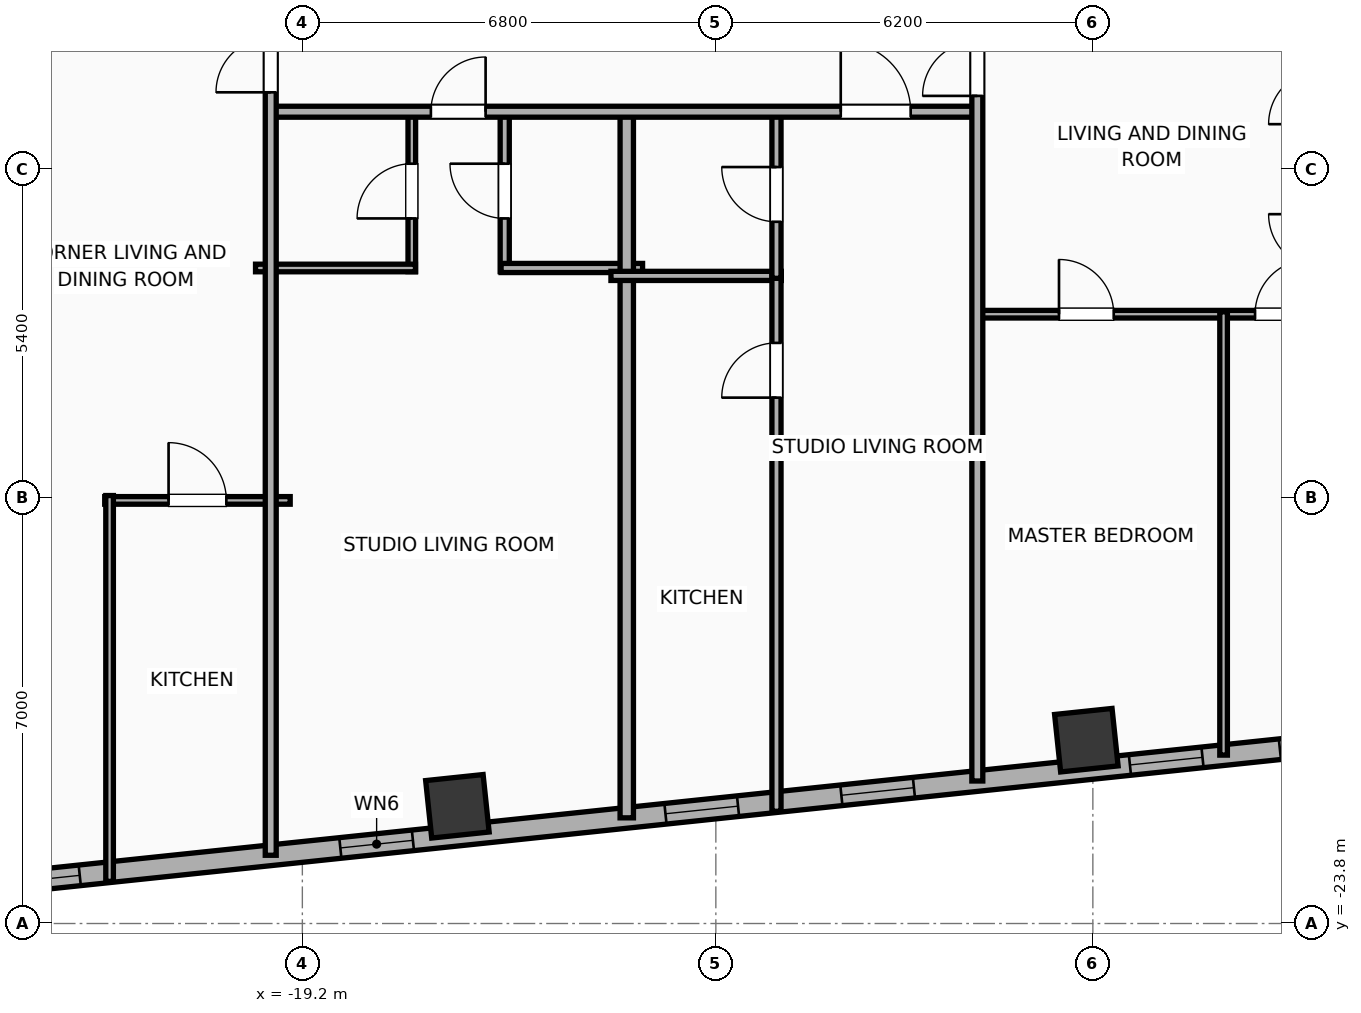
"""IFC4 building model, lengths in metres.
Left out: names, types, materials, properties, quantities, classifications, styles, units other than length and angle.
Written with IfcOpenShell. Run it as: python <this file> out.ifc"""

import sys

from ifc_helpers import new_model, si_unit, direction, frame, frame_2d, origin, origin_2d, place, context, subcontext, project, spatial, rectangle, hollow_rectangle, extrude, element, fill, save


model = new_model("IFC4")
c1 = context("Model", 3, precision=1e-05, world=origin(), true_north=direction((0.0, 1.0)))
c2 = subcontext(c1, "Body", "Model", "MODEL_VIEW")
j1 = project(units=[si_unit("LENGTHUNIT", "METRE"), si_unit("PLANEANGLEUNIT", "RADIAN")], contexts=[c1])
p1 = place(None, origin())
s1 = spatial("IfcSite", under=j1, at=p1, CompositionType="ELEMENT")
p2 = place(p1, origin())
s2 = spatial("IfcBuilding", under=s1, at=p2, CompositionType="ELEMENT")
p3 = place(p2, frame((0.0, 0.0, 156.0)))
s3 = spatial("IfcBuildingStorey", under=s2, at=p3, CompositionType="ELEMENT", Elevation=156.0)
for number, where, z_axis, x_axis in (
    (1, (-16.65, -21.873, 0.0), (0.0, 0.0, 1.0), (0.995, 0.105, 0.0)),
    (2, (-6.307, -20.785, 0.0), (0.0, 0.0, 1.0), (0.995, 0.105, 0.0)),
):
    element("IfcColumn", number, at=place(p3, frame(where, z_axis=z_axis, x_axis=x_axis)), inside=s3, PredefinedType="COLUMN", context=c2, shape_type="SweptSolid", body=[
        extrude(hollow_rectangle(XDim=0.95, YDim=0.95, WallThickness=0.032, at=origin_2d()), origin(), (0.0, 0.0, 1.0), 3.9),
    ])
p4 = place(p3, frame((24.756, -18.003, 0.0), z_axis=(0.0, 0.0, 1.0), x_axis=(-0.99452160744, -0.104531202687, 0.0)))
e3 = element("IfcWall", 3, at=p4, inside=s3, PredefinedType="ELEMENTEDWALL", context=c2, shape_type="SweptSolid", body=[
    extrude(rectangle(XDim=51.967, YDim=0.34, at=frame_2d((25.983, 0.0))), origin(), (0.0, 0.0, 1.0), 3.65),
])
p5 = place(p4, frame((25.633, 0.0, 0.75)))
e4 = element("IfcOpeningElement", 4, at=p5, cuts=e3, PredefinedType="OPENING", context=c2, shape_type="SweptSolid", body=[
    extrude(rectangle(XDim=2.4, YDim=2.1, at=frame_2d((1.2, 1.05))), frame((0.0, 0.18, 0.0), z_axis=(0.0, -1.0, 0.0), x_axis=(1.0, 0.0, 0.0)), (0.0, 0.0, 1.0), 0.36),
])
p6 = place(p4, frame((42.369, 0.0, 0.75)))
e5 = element("IfcOpeningElement", 5, at=p6, cuts=e3, PredefinedType="OPENING", context=c2, shape_type="SweptSolid", body=[
    extrude(rectangle(XDim=1.2, YDim=2.05, at=frame_2d((0.6, 1.025))), frame((0.0, 0.18, 0.0), z_axis=(0.0, -1.0, 0.0), x_axis=(1.0, 0.0, 0.0)), (0.0, 0.0, 1.0), 0.36),
])
p7 = place(p4, frame((34.085, 0.0, 0.75)))
e6 = element("IfcOpeningElement", 6, at=p7, cuts=e3, PredefinedType="OPENING", context=c2, shape_type="SweptSolid", body=[
    extrude(rectangle(XDim=1.2, YDim=2.05, at=frame_2d((0.6, 1.025))), frame((0.0, 0.18, 0.0), z_axis=(0.0, -1.0, 0.0), x_axis=(1.0, 0.0, 0.0)), (0.0, 0.0, 1.0), 0.36),
])
p8 = place(p4, frame((36.993, 0.0, 0.75)))
e7 = element("IfcOpeningElement", 7, at=p8, cuts=e3, PredefinedType="OPENING", context=c2, shape_type="SweptSolid", body=[
    extrude(rectangle(XDim=1.2, YDim=2.05, at=frame_2d((0.6, 1.025))), frame((0.0, 0.18, 0.0), z_axis=(0.0, -1.0, 0.0), x_axis=(1.0, 0.0, 0.0)), (0.0, 0.0, 1.0), 0.36),
])
p9 = place(p4, frame((14.397, 0.0, 0.75)))
e8 = element("IfcOpeningElement", 8, at=p9, cuts=e3, PredefinedType="OPENING", context=c2, shape_type="SweptSolid", body=[
    extrude(rectangle(XDim=1.2, YDim=2.05, at=frame_2d((0.6, 1.025))), frame((0.0, 0.18, 0.0), z_axis=(0.0, -1.0, 0.0), x_axis=(1.0, 0.0, 0.0)), (0.0, 0.0, 1.0), 0.36),
])
p10 = place(p4, frame((11.489, 0.0, 0.75)))
e9 = element("IfcOpeningElement", 9, at=p10, cuts=e3, PredefinedType="OPENING", context=c2, shape_type="SweptSolid", body=[
    extrude(rectangle(XDim=1.2, YDim=2.05, at=frame_2d((0.6, 1.025))), frame((0.0, 0.18, 0.0), z_axis=(0.0, -1.0, 0.0), x_axis=(1.0, 0.0, 0.0)), (0.0, 0.0, 1.0), 0.36),
])
p11 = place(p4, frame((8.521, 0.0, 0.75)))
e10 = element("IfcOpeningElement", 10, at=p11, cuts=e3, PredefinedType="OPENING", context=c2, shape_type="SweptSolid", body=[
    extrude(rectangle(XDim=1.2, YDim=2.05, at=frame_2d((0.6, 1.025))), frame((0.0, 0.18, 0.0), z_axis=(0.0, -1.0, 0.0), x_axis=(1.0, 0.0, 0.0)), (0.0, 0.0, 1.0), 0.36),
])
p12 = place(p4, frame((5.582, 0.0, 0.75)))
e11 = element("IfcOpeningElement", 11, at=p12, cuts=e3, PredefinedType="OPENING", context=c2, shape_type="SweptSolid", body=[
    extrude(rectangle(XDim=1.2, YDim=2.05, at=frame_2d((0.6, 1.025))), frame((0.0, 0.18, 0.0), z_axis=(0.0, -1.0, 0.0), x_axis=(1.0, 0.0, 0.0)), (0.0, 0.0, 1.0), 0.36),
])
p13 = place(p4, frame((29.313, 0.0, 0.75)))
e12 = element("IfcOpeningElement", 12, at=p13, cuts=e3, PredefinedType="OPENING", context=c2, shape_type="SweptSolid", body=[
    extrude(rectangle(XDim=1.2, YDim=2.05, at=frame_2d((0.6, 1.025))), frame((0.0, 0.18, 0.0), z_axis=(0.0, -1.0, 0.0), x_axis=(1.0, 0.0, 0.0)), (0.0, 0.0, 1.0), 0.36),
])
p14 = place(p4, frame((22.248, 0.0, 0.75)))
e13 = element("IfcOpeningElement", 13, at=p14, cuts=e3, PredefinedType="OPENING", context=c2, shape_type="SweptSolid", body=[
    extrude(rectangle(XDim=1.2, YDim=2.05, at=frame_2d((0.6, 1.025))), frame((0.0, 0.18, 0.0), z_axis=(0.0, -1.0, 0.0), x_axis=(1.0, 0.0, 0.0)), (0.0, 0.0, 1.0), 0.36),
])
p15 = place(p4, frame((18.186, 0.0, 0.75)))
e14 = element("IfcOpeningElement", 14, at=p15, cuts=e3, PredefinedType="OPENING", context=c2, shape_type="SweptSolid", body=[
    extrude(rectangle(XDim=1.2, YDim=2.05, at=frame_2d((0.6, 1.025))), frame((0.0, 0.18, 0.0), z_axis=(0.0, -1.0, 0.0), x_axis=(1.0, 0.0, 0.0)), (0.0, 0.0, 1.0), 0.36),
])
p16 = place(p4, frame((47.879, 0.0, 0.75)))
e15 = element("IfcOpeningElement", 15, at=p16, cuts=e3, PredefinedType="OPENING", context=c2, shape_type="SweptSolid", body=[
    extrude(rectangle(XDim=1.2, YDim=2.05, at=frame_2d((0.6, 1.025))), frame((0.0, 0.18, 0.0), z_axis=(0.0, -1.0, 0.0), x_axis=(1.0, 0.0, 0.0)), (0.0, 0.0, 1.0), 0.36),
])
p17 = place(p4, frame((49.844, 0.0, 0.75)))
e16 = element("IfcOpeningElement", 16, at=p17, cuts=e3, PredefinedType="OPENING", context=c2, shape_type="SweptSolid", body=[
    extrude(rectangle(XDim=1.2, YDim=2.05, at=frame_2d((0.6, 1.025))), frame((0.0, 0.18, 0.0), z_axis=(0.0, -1.0, 0.0), x_axis=(1.0, 0.0, 0.0)), (0.0, 0.0, 1.0), 0.36),
])
p18 = place(p3, frame((-17.4, -13.08, 0.0), z_axis=(0.0, 0.0, 1.0), x_axis=(0.0, 1.0, 0.0)))
e17 = element("IfcWall", 17, at=p18, inside=s3, PredefinedType="PARTITIONING", context=c2, shape_type="SweptSolid", body=[
    extrude(rectangle(XDim=2.65, YDim=0.125, at=frame_2d((1.325, 0.0))), origin(), (0.0, 0.0, 1.0), 3.65),
])
p19 = place(p18, frame((0.875, 0.0, 0.0)))
e18 = element("IfcOpeningElement", 18, at=p19, cuts=e17, PredefinedType="OPENING", context=c2, shape_type="SweptSolid", body=[
    extrude(rectangle(XDim=0.9, YDim=2.05, at=frame_2d((0.45, 1.025))), frame((0.0, 0.073, 0.0), z_axis=(0.0, -1.0, 0.0), x_axis=(1.0, 0.0, 0.0)), (0.0, 0.0, 1.0), 0.145),
])
p20 = place(p3, frame((-15.872, -13.08, 0.0), z_axis=(0.0, 0.0, 1.0), x_axis=(0.0, 1.0, 0.0)))
e19 = element("IfcWall", 19, at=p20, inside=s3, PredefinedType="PLUMBINGWALL", context=c2, shape_type="SweptSolid", body=[
    extrude(rectangle(XDim=2.65, YDim=0.15, at=frame_2d((1.325, 0.0))), origin(), (0.0, 0.0, 1.0), 3.04),
])
p21 = place(p20, frame((0.875, 0.0, 0.0)))
e20 = element("IfcOpeningElement", 20, at=p21, cuts=e19, PredefinedType="OPENING", context=c2, shape_type="SweptSolid", body=[
    extrude(rectangle(XDim=0.9, YDim=2.05, at=frame_2d((0.45, 1.025))), frame((0.0, 0.085, 0.0), z_axis=(0.0, -1.0, 0.0), x_axis=(1.0, 0.0, 0.0)), (0.0, 0.0, 1.0), 0.17),
])
p22 = place(p3, frame((-19.97, -13.02, 0.0), z_axis=(0.0, 0.0, 1.0), x_axis=(1.0, 0.0, 0.0)))
e21 = element("IfcWall", 21, at=p22, inside=s3, PredefinedType="PARTITIONING", context=c2, shape_type="SweptSolid", body=[
    extrude(rectangle(XDim=2.63, YDim=0.125, at=frame_2d((1.315, 0.0))), origin(), (0.0, 0.0, 1.0), 3.65),
])
p23 = place(p3, frame((-15.932, -13.02, 0.0), z_axis=(0.0, 0.0, 1.0), x_axis=(1.0, 0.0, 0.0)))
e22 = element("IfcWall", 22, at=p23, inside=s3, PredefinedType="PLUMBINGWALL", context=c2, shape_type="SweptSolid", body=[
    extrude(rectangle(XDim=2.327, YDim=0.15, at=frame_2d((1.164, 0.0))), origin(), (0.0, 0.0, 1.0), 3.65),
])
p24 = place(p3, frame((-13.865, -22.062, 0.0), z_axis=(0.0, 0.0, 1.0), x_axis=(0.0, 1.0, 0.0)))
e23 = element("IfcWall", 23, at=p24, inside=s3, PredefinedType="PARTITIONING", context=c2, shape_type="SweptSolid", body=[
    extrude(rectangle(XDim=11.692, YDim=0.22, at=frame_2d((5.846, 0.0))), origin(), (0.0, 0.0, 1.0), 3.65),
])
p25 = place(p3, frame((-14.125, -13.15, 0.0), z_axis=(0.0, 0.0, 1.0), x_axis=(1.0, 0.0, 0.0)))
e24 = element("IfcWall", 24, at=p25, inside=s3, PredefinedType="PLUMBINGWALL", context=c2, shape_type="SweptSolid", body=[
    extrude(rectangle(XDim=2.802, YDim=0.15, at=frame_2d((1.401, 0.0))), origin(), (0.0, 0.0, 1.0), 3.65),
])
p26 = place(p3, frame((-11.403, -21.954, 0.0), z_axis=(0.0, 0.0, 1.0), x_axis=(0.0, 1.0, 0.0)))
e25 = element("IfcWall", 25, at=p26, inside=s3, PredefinedType="PLUMBINGWALL", context=c2, shape_type="SweptSolid", body=[
    extrude(rectangle(XDim=8.844, YDim=0.15, at=frame_2d((4.422, 0.0))), origin(), (0.0, 0.0, 1.0), 3.65),
])
p27 = place(p26, frame((6.802, 0.0, 0.0)))
e26 = element("IfcOpeningElement", 26, at=p27, cuts=e25, PredefinedType="OPENING", context=c2, shape_type="SweptSolid", body=[
    extrude(rectangle(XDim=0.9, YDim=2.05, at=frame_2d((0.45, 1.025))), frame((0.0, 0.085, 0.0), z_axis=(0.0, -1.0, 0.0), x_axis=(1.0, 0.0, 0.0)), (0.0, 0.0, 1.0), 0.17),
])
p28 = place(p3, frame((-11.403, -13.19, 0.0), z_axis=(0.0, 0.0, 1.0), x_axis=(0.0, 1.0, 0.0)))
e27 = element("IfcWall", 27, at=p28, inside=s3, PredefinedType="PLUMBINGWALL", context=c2, shape_type="SweptSolid", body=[
    extrude(rectangle(XDim=2.76, YDim=0.15, at=frame_2d((1.38, 0.0))), origin(), (0.0, 0.0, 1.0), 3.65),
])
p29 = place(p28, frame((0.93, 0.0, 0.0)))
e28 = element("IfcOpeningElement", 28, at=p29, cuts=e27, PredefinedType="OPENING", context=c2, shape_type="SweptSolid", body=[
    extrude(rectangle(XDim=0.9, YDim=2.05, at=frame_2d((0.45, 1.025))), frame((0.0, 0.085, 0.0), z_axis=(0.0, -1.0, 0.0), x_axis=(1.0, 0.0, 0.0)), (0.0, 0.0, 1.0), 0.17),
])
p30 = place(p3, frame((-19.75, -10.45, 0.0), z_axis=(0.0, 0.0, 1.0), x_axis=(1.0, 0.0, 0.0)))
e29 = element("IfcWall", 29, at=p30, inside=s3, PredefinedType="PARTITIONING", context=c2, shape_type="SweptSolid", body=[
    extrude(rectangle(XDim=11.67, YDim=0.18, at=frame_2d((5.835, 0.0))), origin(), (0.0, 0.0, 1.0), 3.65),
])
p31 = place(p30, frame((2.664, 0.0, 0.0)))
e30 = element("IfcOpeningElement", 30, at=p31, cuts=e29, PredefinedType="OPENING", context=c2, shape_type="SweptSolid", body=[
    extrude(rectangle(XDim=0.9, YDim=2.05, at=frame_2d((0.45, 1.025))), frame((0.0, 0.1, 0.0), z_axis=(0.0, -1.0, 0.0), x_axis=(1.0, 0.0, 0.0)), (0.0, 0.0, 1.0), 0.2),
])
p32 = place(p30, frame((9.404, 0.0, 0.0)))
e31 = element("IfcOpeningElement", 31, at=p32, cuts=e29, PredefinedType="OPENING", context=c2, shape_type="SweptSolid", body=[
    extrude(rectangle(XDim=1.15, YDim=2.05, at=frame_2d((0.575, 1.025))), frame((0.0, 0.1, 0.0), z_axis=(0.0, -1.0, 0.0), x_axis=(1.0, 0.0, 0.0)), (0.0, 0.0, 1.0), 0.2),
])
p33 = place(p3, frame((-8.08, -13.78, 0.0), z_axis=(0.0, 0.0, 1.0), x_axis=(1.0, 0.0, 0.0)))
e32 = element("IfcWall", 32, at=p33, inside=s3, PredefinedType="PARTITIONING", context=c2, shape_type="SweptSolid", body=[
    extrude(rectangle(XDim=8.06, YDim=0.125, at=frame_2d((4.03, 0.0))), origin(), (0.0, 0.0, 1.0), 3.65),
])
p34 = place(p33, frame((1.323, 0.0, 0.0)))
e33 = element("IfcOpeningElement", 33, at=p34, cuts=e32, PredefinedType="OPENING", context=c2, shape_type="SweptSolid", body=[
    extrude(rectangle(XDim=0.9, YDim=2.05, at=frame_2d((0.45, 1.025))), frame((0.0, 0.073, 0.0), z_axis=(0.0, -1.0, 0.0), x_axis=(1.0, 0.0, 0.0)), (0.0, 0.0, 1.0), 0.145),
])
p35 = place(p33, frame((4.547, 0.0, 0.0)))
e34 = element("IfcOpeningElement", 34, at=p35, cuts=e32, PredefinedType="OPENING", context=c2, shape_type="SweptSolid", body=[
    extrude(rectangle(XDim=0.9, YDim=2.05, at=frame_2d((0.45, 1.025))), frame((0.0, 0.073, 0.0), z_axis=(0.0, -1.0, 0.0), x_axis=(1.0, 0.0, 0.0)), (0.0, 0.0, 1.0), 0.145),
])
p36 = place(p3, frame((-4.05, -21.031, 0.0), z_axis=(0.0, 0.0, 1.0), x_axis=(0.0, 1.0, 0.0)))
e35 = element("IfcWall", 35, at=p36, inside=s3, PredefinedType="PARTITIONING", context=c2, shape_type="SweptSolid", body=[
    extrude(rectangle(XDim=7.291, YDim=0.125, at=frame_2d((3.646, 0.0))), origin(), (0.0, 0.0, 1.0), 3.65),
])
p37 = place(p3, frame((-8.1, -21.456, 0.0), z_axis=(0.0, 0.0, 1.0), x_axis=(0.0, 1.0, 0.0)))
e36 = element("IfcWall", 36, at=p37, inside=s3, PredefinedType="PARTITIONING", context=c2, shape_type="SweptSolid", body=[
    extrude(rectangle(XDim=12.516, YDim=0.18, at=frame_2d((6.258, 0.0))), origin(), (0.0, 0.0, 1.0), 3.65),
])
p38 = place(p37, frame((11.267, 0.0, 0.0)))
e37 = element("IfcOpeningElement", 37, at=p38, cuts=e36, PredefinedType="OPENING", context=c2, shape_type="SweptSolid", body=[
    extrude(rectangle(XDim=0.9, YDim=2.05, at=frame_2d((0.45, 1.025))), frame((0.0, 0.1, 0.0), z_axis=(0.0, -1.0, 0.0), x_axis=(1.0, 0.0, 0.0)), (0.0, 0.0, 1.0), 0.2),
])
p39 = place(p3, frame((-22.45, -16.842, 0.0), z_axis=(0.0, 0.0, 1.0), x_axis=(1.0, 0.0, 0.0)))
e38 = element("IfcWall", 38, at=p39, inside=s3, PredefinedType="PARTITIONING", context=c2, shape_type="SweptSolid", body=[
    extrude(rectangle(XDim=3.05, YDim=0.125, at=frame_2d((1.525, 0.0))), origin(), (0.0, 0.0, 1.0), 3.65),
])
p40 = place(p39, frame((1.05, 0.0, 0.0)))
e39 = element("IfcOpeningElement", 39, at=p40, cuts=e38, PredefinedType="OPENING", context=c2, shape_type="SweptSolid", body=[
    extrude(rectangle(XDim=0.95, YDim=2.05, at=frame_2d((0.475, 1.025))), frame((0.0, 0.073, 0.0), z_axis=(0.0, -1.0, 0.0), x_axis=(1.0, 0.0, 0.0)), (0.0, 0.0, 1.0), 0.145),
])
p41 = place(p3, frame((-22.37, -23.107, 0.0), z_axis=(0.0, 0.0, 1.0), x_axis=(0.0, 1.0, 0.0)))
e40 = element("IfcWall", 40, at=p41, inside=s3, PredefinedType="PARTITIONING", context=c2, shape_type="SweptSolid", body=[
    extrude(rectangle(XDim=6.345, YDim=0.125, at=frame_2d((3.173, 0.0))), origin(), (0.0, 0.0, 1.0), 3.65),
])
p42 = place(p3, frame((-19.72, -22.678, 0.0), z_axis=(0.0, 0.0, 1.0), x_axis=(0.0, 1.0, 0.0)))
e41 = element("IfcWall", 41, at=p42, inside=s3, PredefinedType="PARTITIONING", context=c2, shape_type="SweptSolid", body=[
    extrude(rectangle(XDim=21.178, YDim=0.18, at=frame_2d((10.589, 0.0))), origin(), (0.0, 0.0, 1.0), 3.65),
])
p43 = place(p42, frame((12.547, 0.0, 0.0)))
e42 = element("IfcOpeningElement", 42, at=p43, cuts=e41, PredefinedType="OPENING", context=c2, shape_type="SweptSolid", body=[
    extrude(rectangle(XDim=0.9, YDim=2.05, at=frame_2d((0.45, 1.025))), frame((0.0, 0.1, 0.0), z_axis=(0.0, -1.0, 0.0), x_axis=(1.0, 0.0, 0.0)), (0.0, 0.0, 1.0), 0.2),
])
p44 = place(p5, origin())
e43 = element("IfcWindow", 43, at=p44, inside=s3, PartitioningType="SINGLE_PANEL", PredefinedType="WINDOW", context=c2, shape_type="SweptSolid", body=[
    extrude(rectangle(XDim=2.4, YDim=2.1, at=frame_2d((1.2, 1.05))), frame((0.0, 0.03, 0.0), z_axis=(0.0, -1.0, 0.0), x_axis=(1.0, 0.0, 0.0)), (0.0, 0.0, 1.0), 0.06),
])
fill(e4, e43)
p45 = place(p6, origin())
e44 = element("IfcWindow", 44, at=p45, inside=s3, PartitioningType="SINGLE_PANEL", PredefinedType="WINDOW", context=c2, shape_type="SweptSolid", body=[
    extrude(rectangle(XDim=1.2, YDim=2.05, at=frame_2d((0.6, 1.025))), frame((0.0, 0.03, 0.0), z_axis=(0.0, -1.0, 0.0), x_axis=(1.0, 0.0, 0.0)), (0.0, 0.0, 1.0), 0.06),
])
fill(e5, e44)
p46 = place(p7, origin())
e45 = element("IfcWindow", 45, at=p46, inside=s3, PartitioningType="SINGLE_PANEL", PredefinedType="WINDOW", context=c2, shape_type="SweptSolid", body=[
    extrude(rectangle(XDim=1.2, YDim=2.05, at=frame_2d((0.6, 1.025))), frame((0.0, 0.03, 0.0), z_axis=(0.0, -1.0, 0.0), x_axis=(1.0, 0.0, 0.0)), (0.0, 0.0, 1.0), 0.06),
])
fill(e6, e45)
p47 = place(p8, origin())
e46 = element("IfcWindow", 46, at=p47, inside=s3, PartitioningType="SINGLE_PANEL", PredefinedType="WINDOW", context=c2, shape_type="SweptSolid", body=[
    extrude(rectangle(XDim=1.2, YDim=2.05, at=frame_2d((0.6, 1.025))), frame((0.0, 0.03, 0.0), z_axis=(0.0, -1.0, 0.0), x_axis=(1.0, 0.0, 0.0)), (0.0, 0.0, 1.0), 0.06),
])
fill(e7, e46)
p48 = place(p13, origin())
e47 = element("IfcWindow", 47, at=p48, inside=s3, PartitioningType="SINGLE_PANEL", PredefinedType="WINDOW", context=c2, shape_type="SweptSolid", body=[
    extrude(rectangle(XDim=1.2, YDim=2.05, at=frame_2d((0.6, 1.025))), frame((0.0, 0.03, 0.0), z_axis=(0.0, -1.0, 0.0), x_axis=(1.0, 0.0, 0.0)), (0.0, 0.0, 1.0), 0.06),
])
fill(e12, e47)
p49 = place(p16, origin())
e48 = element("IfcWindow", 48, at=p49, inside=s3, PartitioningType="SINGLE_PANEL", PredefinedType="WINDOW", context=c2, shape_type="SweptSolid", body=[
    extrude(rectangle(XDim=1.2, YDim=2.05, at=frame_2d((0.6, 1.025))), frame((0.0, 0.03, 0.0), z_axis=(0.0, -1.0, 0.0), x_axis=(1.0, 0.0, 0.0)), (0.0, 0.0, 1.0), 0.06),
])
fill(e15, e48)
p50 = place(p19, origin())
e49 = element("IfcDoor", 49, at=p50, inside=s3, OperationType="SINGLE_SWING_LEFT", PredefinedType="DOOR", context=c2, shape_type="SweptSolid", body=[
    extrude(rectangle(XDim=0.9, YDim=2.05, at=frame_2d((0.45, 1.025))), frame((0.0, 0.025, 0.0), z_axis=(0.0, -1.0, 0.0), x_axis=(1.0, 0.0, 0.0)), (0.0, 0.0, 1.0), 0.05),
])
fill(e18, e49)
p51 = place(p21, origin())
e50 = element("IfcDoor", 50, at=p51, inside=s3, OperationType="SINGLE_SWING_RIGHT", PredefinedType="DOOR", context=c2, shape_type="SweptSolid", body=[
    extrude(rectangle(XDim=0.9, YDim=2.05, at=frame_2d((0.45, 1.025))), frame((0.0, 0.025, 0.0), z_axis=(0.0, -1.0, 0.0), x_axis=(1.0, 0.0, 0.0)), (0.0, 0.0, 1.0), 0.05),
])
fill(e20, e50)
p52 = place(p27, origin())
e51 = element("IfcDoor", 51, at=p52, inside=s3, OperationType="SINGLE_SWING_LEFT", PredefinedType="DOOR", context=c2, shape_type="SweptSolid", body=[
    extrude(rectangle(XDim=0.9, YDim=2.05, at=frame_2d((0.45, 1.025))), frame((0.0, 0.025, 0.0), z_axis=(0.0, -1.0, 0.0), x_axis=(1.0, 0.0, 0.0)), (0.0, 0.0, 1.0), 0.05),
])
fill(e26, e51)
p53 = place(p29, origin())
e52 = element("IfcDoor", 52, at=p53, inside=s3, OperationType="SINGLE_SWING_RIGHT", PredefinedType="DOOR", context=c2, shape_type="SweptSolid", body=[
    extrude(rectangle(XDim=0.9, YDim=2.05, at=frame_2d((0.45, 1.025))), frame((0.0, 0.025, 0.0), z_axis=(0.0, -1.0, 0.0), x_axis=(1.0, 0.0, 0.0)), (0.0, 0.0, 1.0), 0.05),
])
fill(e28, e52)
p54 = place(p31, origin())
e53 = element("IfcDoor", 53, at=p54, inside=s3, OperationType="SINGLE_SWING_RIGHT", PredefinedType="DOOR", context=c2, shape_type="SweptSolid", body=[
    extrude(rectangle(XDim=0.9, YDim=2.05, at=frame_2d((0.45, 1.025))), frame((0.0, 0.025, 0.0), z_axis=(0.0, -1.0, 0.0), x_axis=(1.0, 0.0, 0.0)), (0.0, 0.0, 1.0), 0.05),
])
fill(e30, e53)
p55 = place(p32, origin())
e54 = element("IfcDoor", 54, at=p55, inside=s3, OperationType="SINGLE_SWING_LEFT", PredefinedType="DOOR", context=c2, shape_type="SweptSolid", body=[
    extrude(rectangle(XDim=1.15, YDim=2.05, at=frame_2d((0.575, 1.025))), frame((0.0, 0.025, 0.0), z_axis=(0.0, -1.0, 0.0), x_axis=(1.0, 0.0, 0.0)), (0.0, 0.0, 1.0), 0.05),
])
fill(e31, e54)
p56 = place(p34, origin())
e55 = element("IfcDoor", 55, at=p56, inside=s3, OperationType="SINGLE_SWING_LEFT", PredefinedType="DOOR", context=c2, shape_type="SweptSolid", body=[
    extrude(rectangle(XDim=0.9, YDim=2.05, at=frame_2d((0.45, 1.025))), frame((0.0, 0.025, 0.0), z_axis=(0.0, -1.0, 0.0), x_axis=(1.0, 0.0, 0.0)), (0.0, 0.0, 1.0), 0.05),
])
fill(e33, e55)
p57 = place(p35, origin())
e56 = element("IfcDoor", 56, at=p57, inside=s3, OperationType="SINGLE_SWING_RIGHT", PredefinedType="DOOR", context=c2, shape_type="SweptSolid", body=[
    extrude(rectangle(XDim=0.9, YDim=2.05, at=frame_2d((0.45, 1.025))), frame((0.0, 0.025, 0.0), z_axis=(0.0, -1.0, 0.0), x_axis=(1.0, 0.0, 0.0)), (0.0, 0.0, 1.0), 0.05),
])
fill(e34, e56)
p58 = place(p38, origin())
e57 = element("IfcDoor", 57, at=p58, inside=s3, OperationType="SINGLE_SWING_LEFT", PredefinedType="DOOR", context=c2, shape_type="SweptSolid", body=[
    extrude(rectangle(XDim=0.9, YDim=2.05, at=frame_2d((0.45, 1.025))), frame((0.0, 0.025, 0.0), z_axis=(0.0, -1.0, 0.0), x_axis=(1.0, 0.0, 0.0)), (0.0, 0.0, 1.0), 0.05),
])
fill(e37, e57)
p59 = place(p40, origin())
e58 = element("IfcDoor", 58, at=p59, inside=s3, OperationType="SINGLE_SWING_LEFT", PredefinedType="DOOR", context=c2, shape_type="SweptSolid", body=[
    extrude(rectangle(XDim=0.95, YDim=2.05, at=frame_2d((0.475, 1.025))), frame((0.0, 0.025, 0.0), z_axis=(0.0, -1.0, 0.0), x_axis=(1.0, 0.0, 0.0)), (0.0, 0.0, 1.0), 0.05),
])
fill(e39, e58)
p60 = place(p43, origin())
e59 = element("IfcDoor", 59, at=p60, inside=s3, OperationType="SINGLE_SWING_LEFT", PredefinedType="DOOR", context=c2, shape_type="SweptSolid", body=[
    extrude(rectangle(XDim=0.9, YDim=2.05, at=frame_2d((0.45, 1.025))), frame((0.0, 0.025, 0.0), z_axis=(0.0, -1.0, 0.0), x_axis=(1.0, 0.0, 0.0)), (0.0, 0.0, 1.0), 0.05),
])
fill(e42, e59)
save(model, sys.argv[1])
